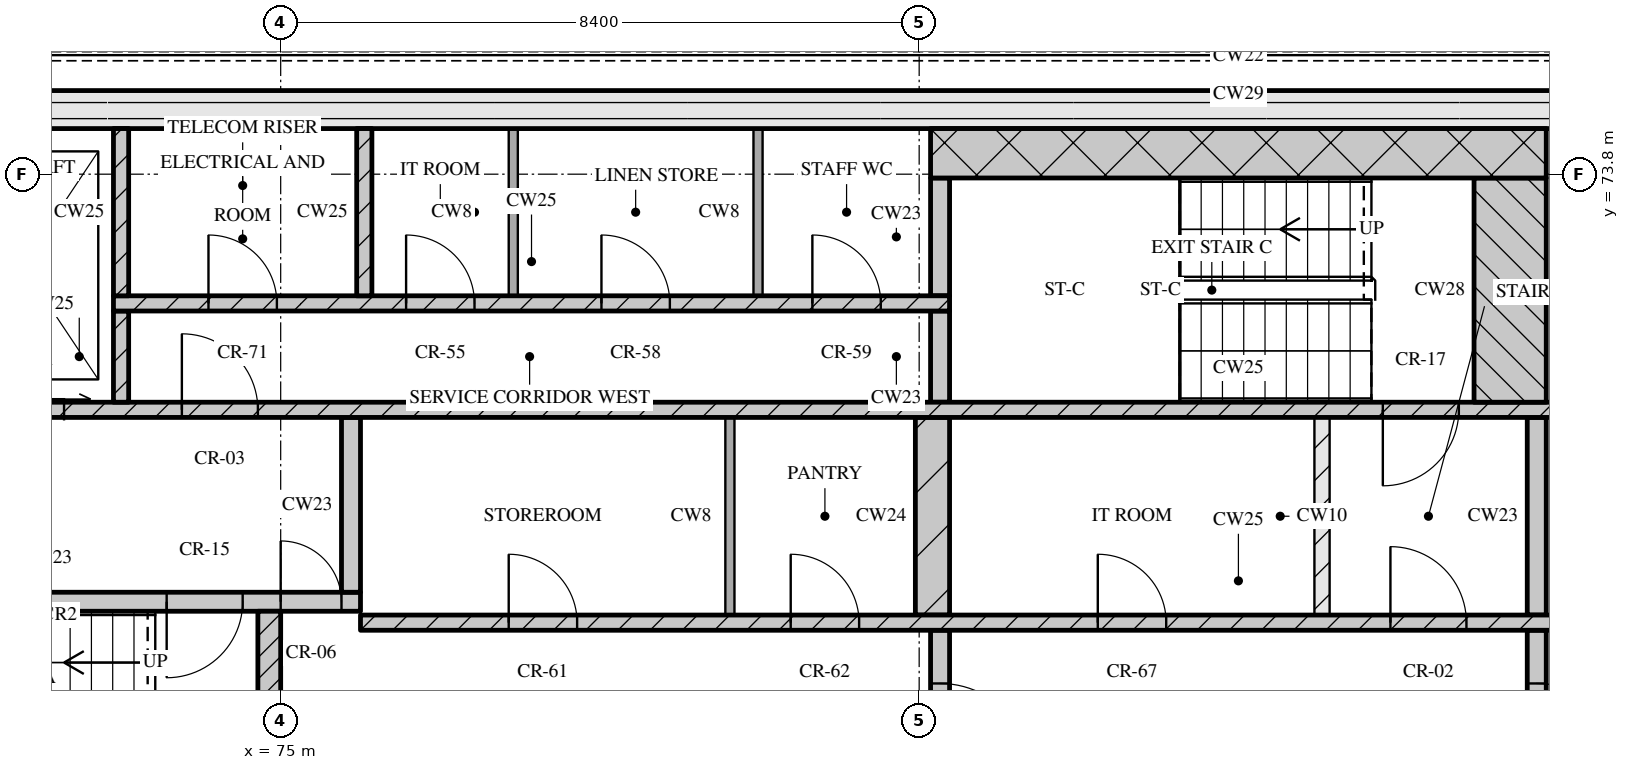
"""IFC4 building model, lengths in metres.
Left out: names, types, materials, properties, quantities, classifications, styles, units other than length and angle.
Written with IfcOpenShell. Run it as: python <this file> out.ifc"""

import sys

from ifc_helpers import new_model, si_unit, direction, frame, frame_2d, origin, place, context, subcontext, project, spatial, rectangle, extrude, element, fill, save


model = new_model("IFC4")
c1 = context("Model", 3, precision=1e-05, world=origin(), true_north=direction((0.0, 1.0)))
c2 = subcontext(c1, "Body", "Model", "MODEL_VIEW")
j1 = project(units=[si_unit("LENGTHUNIT", "METRE"), si_unit("PLANEANGLEUNIT", "RADIAN")], contexts=[c1])
p1 = place(None, origin())
s1 = spatial("IfcSite", under=j1, at=p1, CompositionType="ELEMENT")
p2 = place(p1, origin())
s2 = spatial("IfcBuilding", under=s1, at=p2, CompositionType="ELEMENT")
p3 = place(p2, frame((0.0, 0.0, 288.75)))
s3 = spatial("IfcBuildingStorey", under=s2, at=p3, CompositionType="ELEMENT", Elevation=288.75)
p4 = place(p3, frame((67.3, 74.65, 0.0), z_axis=(0.0, 0.0, 1.0), x_axis=(1.0, 0.0, 0.0)))
e1 = element("IfcWall", 1, at=p4, inside=s3, PredefinedType="SOLIDWALL", context=c2, shape_type="SweptSolid", body=[
    extrude(rectangle(XDim=40.6, YDim=0.5, at=frame_2d((20.3, 0.0))), origin(), (0.0, 0.0, 1.0), 3.32),
])
p5 = place(p3, frame((74.85, 65.2, 0.0), z_axis=(0.0, 0.0, 1.0), x_axis=(0.0, 1.0, 0.0)))
e2 = element("IfcWall", 2, at=p5, inside=s3, PredefinedType="SOLIDWALL", context=c2, shape_type="SweptSolid", body=[
    extrude(rectangle(XDim=2.85, YDim=0.3, at=frame_2d((1.425, 0.0))), origin(), (0.0, 0.0, 1.0), 3.32),
])
p6 = place(p3, frame((83.675, 65.2, 0.0), z_axis=(0.0, 0.0, 1.0), x_axis=(0.0, 1.0, 0.0)))
e3 = element("IfcWall", 3, at=p6, inside=s3, PredefinedType="SOLIDWALL", context=c2, shape_type="SweptSolid", body=[
    extrude(rectangle(XDim=2.6, YDim=0.25, at=frame_2d((1.3, 0.0))), origin(), (0.0, 0.0, 1.0), 3.32),
])
p7 = place(p6, frame((0.7, 0.0, 0.0)))
e4 = element("IfcOpeningElement", 4, at=p7, cuts=e3, PredefinedType="OPENING", context=c2, shape_type="SweptSolid", body=[
    extrude(rectangle(XDim=1.2, YDim=2.1, at=frame_2d((0.6, 1.05))), frame((0.0, 0.135, 0.0), z_axis=(0.0, -1.0, 0.0), x_axis=(1.0, 0.0, 0.0)), (0.0, 0.0, 1.0), 0.27),
])
p8 = place(p3, frame((91.525, 65.2, 0.0), z_axis=(0.0, 0.0, 1.0), x_axis=(0.0, 1.0, 0.0)))
e5 = element("IfcWall", 5, at=p8, inside=s3, PredefinedType="SOLIDWALL", context=c2, shape_type="SweptSolid", body=[
    extrude(rectangle(XDim=2.6, YDim=0.25, at=frame_2d((1.3, 0.0))), origin(), (0.0, 0.0, 1.0), 3.32),
])
p9 = place(p8, frame((0.7, 0.0, 0.0)))
e6 = element("IfcOpeningElement", 6, at=p9, cuts=e5, PredefinedType="OPENING", context=c2, shape_type="SweptSolid", body=[
    extrude(rectangle(XDim=1.2, YDim=2.1, at=frame_2d((0.6, 1.05))), frame((0.0, 0.135, 0.0), z_axis=(0.0, -1.0, 0.0), x_axis=(1.0, 0.0, 0.0)), (0.0, 0.0, 1.0), 0.27),
])
p10 = place(p3, frame((76.05, 67.9, 0.0), z_axis=(0.0, 0.0, 1.0), x_axis=(1.0, 0.0, 0.0)))
e7 = element("IfcWall", 7, at=p10, inside=s3, PredefinedType="SOLIDWALL", context=c2, shape_type="SweptSolid", body=[
    extrude(rectangle(XDim=23.1, YDim=0.2, at=frame_2d((11.55, 0.0))), origin(), (0.0, 0.0, 1.0), 3.32),
])
p11 = place(p10, frame((1.95, 0.0, 0.0)))
e8 = element("IfcOpeningElement", 8, at=p11, cuts=e7, PredefinedType="OPENING", context=c2, shape_type="SweptSolid", body=[
    extrude(rectangle(XDim=0.9, YDim=2.1, at=frame_2d((0.45, 1.05))), frame((0.0, 0.11, 0.0), z_axis=(0.0, -1.0, 0.0), x_axis=(1.0, 0.0, 0.0)), (0.0, 0.0, 1.0), 0.22),
])
p12 = place(p10, frame((5.66, 0.0, 0.0)))
e9 = element("IfcOpeningElement", 9, at=p12, cuts=e7, PredefinedType="OPENING", context=c2, shape_type="SweptSolid", body=[
    extrude(rectangle(XDim=0.9, YDim=2.1, at=frame_2d((0.45, 1.05))), frame((0.0, 0.11, 0.0), z_axis=(0.0, -1.0, 0.0), x_axis=(1.0, 0.0, 0.0)), (0.0, 0.0, 1.0), 0.22),
])
p13 = place(p10, frame((9.7, 0.0, 0.0)))
e10 = element("IfcOpeningElement", 10, at=p13, cuts=e7, PredefinedType="OPENING", context=c2, shape_type="SweptSolid", body=[
    extrude(rectangle(XDim=0.9, YDim=2.1, at=frame_2d((0.45, 1.05))), frame((0.0, 0.11, 0.0), z_axis=(0.0, -1.0, 0.0), x_axis=(1.0, 0.0, 0.0)), (0.0, 0.0, 1.0), 0.22),
])
p14 = place(p10, frame((13.55, 0.0, 0.0)))
e11 = element("IfcOpeningElement", 11, at=p14, cuts=e7, PredefinedType="OPENING", context=c2, shape_type="SweptSolid", body=[
    extrude(rectangle(XDim=1.0, YDim=2.1, at=frame_2d((0.5, 1.05))), frame((0.0, 0.11, 0.0), z_axis=(0.0, -1.0, 0.0), x_axis=(1.0, 0.0, 0.0)), (0.0, 0.0, 1.0), 0.22),
])
p15 = place(p10, frame((16.2, 0.0, 0.0)))
e12 = element("IfcOpeningElement", 12, at=p15, cuts=e7, PredefinedType="OPENING", context=c2, shape_type="SweptSolid", body=[
    extrude(rectangle(XDim=1.1, YDim=2.1, at=frame_2d((0.55, 1.05))), frame((0.0, 0.11, 0.0), z_axis=(0.0, -1.0, 0.0), x_axis=(1.0, 0.0, 0.0)), (0.0, 0.0, 1.0), 0.22),
])
p16 = place(p10, frame((18.7, 0.0, 0.0)))
e13 = element("IfcOpeningElement", 13, at=p16, cuts=e7, PredefinedType="OPENING", context=c2, shape_type="SweptSolid", body=[
    extrude(rectangle(XDim=1.1, YDim=2.1, at=frame_2d((0.55, 1.05))), frame((0.0, 0.11, 0.0), z_axis=(0.0, -1.0, 0.0), x_axis=(1.0, 0.0, 0.0)), (0.0, 0.0, 1.0), 0.22),
])
p17 = place(p10, frame((21.2, 0.0, 0.0)))
e14 = element("IfcOpeningElement", 14, at=p17, cuts=e7, PredefinedType="OPENING", context=c2, shape_type="SweptSolid", body=[
    extrude(rectangle(XDim=1.1, YDim=2.1, at=frame_2d((0.55, 1.05))), frame((0.0, 0.11, 0.0), z_axis=(0.0, -1.0, 0.0), x_axis=(1.0, 0.0, 0.0)), (0.0, 0.0, 1.0), 0.22),
])
p18 = place(p3, frame((80.91, 68.0, 0.0), z_axis=(0.0, 0.0, 1.0), x_axis=(0.0, 1.0, 0.0)))
e15 = element("IfcWall", 15, at=p18, inside=s3, PredefinedType="PARTITIONING", context=c2, shape_type="SweptSolid", body=[
    extrude(rectangle(XDim=2.6, YDim=0.12, at=frame_2d((1.3, 0.0))), origin(), (0.0, 0.0, 1.0), 3.32),
])
p19 = place(p3, frame((83.575, 68.0, 0.0), z_axis=(0.0, 0.0, 1.0), x_axis=(0.0, 1.0, 0.0)))
e16 = element("IfcWall", 16, at=p19, inside=s3, PredefinedType="SOLIDWALL", context=c2, shape_type="SweptSolid", body=[
    extrude(rectangle(XDim=2.6, YDim=0.45, at=frame_2d((1.3, 0.0))), origin(), (0.0, 0.0, 1.0), 3.32),
])
p20 = place(p3, frame((88.7, 68.0, 0.0), z_axis=(0.0, 0.0, 1.0), x_axis=(0.0, 1.0, 0.0)))
e17 = element("IfcWall", 17, at=p20, inside=s3, PredefinedType="PARTITIONING", context=c2, shape_type="SweptSolid", body=[
    extrude(rectangle(XDim=2.6, YDim=0.2, at=frame_2d((1.3, 0.0))), origin(), (0.0, 0.0, 1.0), 3.32),
])
p21 = place(p3, frame((91.525, 68.0, 0.0), z_axis=(0.0, 0.0, 1.0), x_axis=(0.0, 1.0, 0.0)))
e18 = element("IfcWall", 18, at=p21, inside=s3, PredefinedType="SOLIDWALL", context=c2, shape_type="SweptSolid", body=[
    extrude(rectangle(XDim=2.6, YDim=0.25, at=frame_2d((1.3, 0.0))), origin(), (0.0, 0.0, 1.0), 3.32),
])
p22 = place(p3, frame((67.8, 68.175, 0.0), z_axis=(0.0, 0.0, 1.0), x_axis=(1.0, 0.0, 0.0)))
e19 = element("IfcWall", 19, at=p22, inside=s3, PredefinedType="SOLIDWALL", context=c2, shape_type="SweptSolid", body=[
    extrude(rectangle(XDim=8.25, YDim=0.25, at=frame_2d((4.125, 0.0))), origin(), (0.0, 0.0, 1.0), 3.32),
])
p23 = place(p22, frame((5.7, 0.0, 0.0)))
e20 = element("IfcOpeningElement", 20, at=p23, cuts=e19, PredefinedType="OPENING", context=c2, shape_type="SweptSolid", body=[
    extrude(rectangle(XDim=1.0, YDim=2.1, at=frame_2d((0.5, 1.05))), frame((0.0, 0.135, 0.0), z_axis=(0.0, -1.0, 0.0), x_axis=(1.0, 0.0, 0.0)), (0.0, 0.0, 1.0), 0.27),
])
p24 = place(p22, frame((7.2, 0.0, 0.0)))
e21 = element("IfcOpeningElement", 21, at=p24, cuts=e19, PredefinedType="OPENING", context=c2, shape_type="SweptSolid", body=[
    extrude(rectangle(XDim=0.8, YDim=2.1, at=frame_2d((0.4, 1.05))), frame((0.0, 0.135, 0.0), z_axis=(0.0, -1.0, 0.0), x_axis=(1.0, 0.0, 0.0)), (0.0, 0.0, 1.0), 0.27),
])
p25 = place(p3, frame((75.925, 68.3, 0.0), z_axis=(0.0, 0.0, 1.0), x_axis=(0.0, 1.0, 0.0)))
e22 = element("IfcWall", 22, at=p25, inside=s3, PredefinedType="SOLIDWALL", context=c2, shape_type="SweptSolid", body=[
    extrude(rectangle(XDim=2.3, YDim=0.25, at=frame_2d((1.15, 0.0))), origin(), (0.0, 0.0, 1.0), 3.32),
])
p26 = place(p3, frame((67.8, 70.7, 0.0), z_axis=(0.0, 0.0, 1.0), x_axis=(1.0, 0.0, 0.0)))
e23 = element("IfcWall", 23, at=p26, inside=s3, PredefinedType="SOLIDWALL", context=c2, shape_type="SweptSolid", body=[
    extrude(rectangle(XDim=39.6, YDim=0.2, at=frame_2d((19.8, 0.0))), origin(), (0.0, 0.0, 1.0), 3.32),
])
p27 = place(p26, frame((0.65, 0.0, 0.0)))
e24 = element("IfcOpeningElement", 24, at=p27, cuts=e23, PredefinedType="OPENING", context=c2, shape_type="SweptSolid", body=[
    extrude(rectangle(XDim=1.1, YDim=2.1, at=frame_2d((0.55, 1.05))), frame((0.0, 0.11, 0.0), z_axis=(0.0, -1.0, 0.0), x_axis=(1.0, 0.0, 0.0)), (0.0, 0.0, 1.0), 0.22),
])
p28 = place(p26, frame((3.25, 0.0, 0.0)))
e25 = element("IfcOpeningElement", 25, at=p28, cuts=e23, PredefinedType="OPENING", context=c2, shape_type="SweptSolid", body=[
    extrude(rectangle(XDim=1.1, YDim=2.1, at=frame_2d((0.55, 1.05))), frame((0.0, 0.11, 0.0), z_axis=(0.0, -1.0, 0.0), x_axis=(1.0, 0.0, 0.0)), (0.0, 0.0, 1.0), 0.22),
])
p29 = place(p26, frame((5.9, 0.0, 0.0)))
e26 = element("IfcOpeningElement", 26, at=p29, cuts=e23, PredefinedType="OPENING", context=c2, shape_type="SweptSolid", body=[
    extrude(rectangle(XDim=1.0, YDim=2.1, at=frame_2d((0.5, 1.05))), frame((0.0, 0.11, 0.0), z_axis=(0.0, -1.0, 0.0), x_axis=(1.0, 0.0, 0.0)), (0.0, 0.0, 1.0), 0.22),
])
p30 = place(p26, frame((21.7, 0.0, 0.0)))
e27 = element("IfcOpeningElement", 27, at=p30, cuts=e23, PredefinedType="OPENING", context=c2, shape_type="SweptSolid", body=[
    extrude(rectangle(XDim=1.0, YDim=2.1, at=frame_2d((0.5, 1.05))), frame((0.0, 0.11, 0.0), z_axis=(0.0, -1.0, 0.0), x_axis=(1.0, 0.0, 0.0)), (0.0, 0.0, 1.0), 0.22),
])
p31 = place(p26, frame((32.7, 0.0, 0.0)))
e28 = element("IfcOpeningElement", 28, at=p31, cuts=e23, PredefinedType="OPENING", context=c2, shape_type="SweptSolid", body=[
    extrude(rectangle(XDim=1.0, YDim=2.1, at=frame_2d((0.5, 1.05))), frame((0.0, 0.11, 0.0), z_axis=(0.0, -1.0, 0.0), x_axis=(1.0, 0.0, 0.0)), (0.0, 0.0, 1.0), 0.22),
])
p32 = place(p26, frame((35.25, 0.0, 0.0)))
e29 = element("IfcOpeningElement", 29, at=p32, cuts=e23, PredefinedType="OPENING", context=c2, shape_type="SweptSolid", body=[
    extrude(rectangle(XDim=1.1, YDim=2.1, at=frame_2d((0.55, 1.05))), frame((0.0, 0.11, 0.0), z_axis=(0.0, -1.0, 0.0), x_axis=(1.0, 0.0, 0.0)), (0.0, 0.0, 1.0), 0.22),
])
p33 = place(p26, frame((37.85, 0.0, 0.0)))
e30 = element("IfcOpeningElement", 30, at=p33, cuts=e23, PredefinedType="OPENING", context=c2, shape_type="SweptSolid", body=[
    extrude(rectangle(XDim=1.1, YDim=2.1, at=frame_2d((0.55, 1.05))), frame((0.0, 0.11, 0.0), z_axis=(0.0, -1.0, 0.0), x_axis=(1.0, 0.0, 0.0)), (0.0, 0.0, 1.0), 0.22),
])
p34 = place(p3, frame((72.9, 70.8, 0.0), z_axis=(0.0, 0.0, 1.0), x_axis=(0.0, 1.0, 0.0)))
e31 = element("IfcWall", 31, at=p34, inside=s3, PredefinedType="SOLIDWALL", context=c2, shape_type="SweptSolid", body=[
    extrude(rectangle(XDim=1.2, YDim=0.2, at=frame_2d((0.6, 0.0))), origin(), (0.0, 0.0, 1.0), 3.32),
])
p35 = place(p3, frame((83.675, 70.8, 0.0), z_axis=(0.0, 0.0, 1.0), x_axis=(0.0, 1.0, 0.0)))
e32 = element("IfcWall", 32, at=p35, inside=s3, PredefinedType="SOLIDWALL", context=c2, shape_type="SweptSolid", body=[
    extrude(rectangle(XDim=1.2, YDim=0.25, at=frame_2d((0.6, 0.0))), origin(), (0.0, 0.0, 1.0), 3.32),
])
p36 = place(p3, frame((91.175, 70.8, 0.0), z_axis=(0.0, 0.0, 1.0), x_axis=(0.0, 1.0, 0.0)))
e33 = element("IfcWall", 33, at=p36, inside=s3, PredefinedType="SOLIDWALL", context=c2, shape_type="SweptSolid", body=[
    extrude(rectangle(XDim=2.95, YDim=0.95, at=frame_2d((1.475, 0.0))), origin(), (0.0, 0.0, 1.0), 3.32),
])
p37 = place(p3, frame((72.8, 72.1, 0.0), z_axis=(0.0, 0.0, 1.0), x_axis=(1.0, 0.0, 0.0)))
e34 = element("IfcWall", 34, at=p37, inside=s3, PredefinedType="SOLIDWALL", context=c2, shape_type="SweptSolid", body=[
    extrude(rectangle(XDim=11.0, YDim=0.2, at=frame_2d((5.5, 0.0))), origin(), (0.0, 0.0, 1.0), 3.32),
])
p38 = place(p37, frame((1.25, 0.0, 0.0)))
e35 = element("IfcOpeningElement", 35, at=p38, cuts=e34, PredefinedType="OPENING", context=c2, shape_type="SweptSolid", body=[
    extrude(rectangle(XDim=0.9, YDim=2.1, at=frame_2d((0.45, 1.05))), frame((0.0, 0.11, 0.0), z_axis=(0.0, -1.0, 0.0), x_axis=(1.0, 0.0, 0.0)), (0.0, 0.0, 1.0), 0.22),
])
p39 = place(p37, frame((3.85, 0.0, 0.0)))
e36 = element("IfcOpeningElement", 36, at=p39, cuts=e34, PredefinedType="OPENING", context=c2, shape_type="SweptSolid", body=[
    extrude(rectangle(XDim=0.9, YDim=2.1, at=frame_2d((0.45, 1.05))), frame((0.0, 0.11, 0.0), z_axis=(0.0, -1.0, 0.0), x_axis=(1.0, 0.0, 0.0)), (0.0, 0.0, 1.0), 0.22),
])
p40 = place(p37, frame((6.42, 0.0, 0.0)))
e37 = element("IfcOpeningElement", 37, at=p40, cuts=e34, PredefinedType="OPENING", context=c2, shape_type="SweptSolid", body=[
    extrude(rectangle(XDim=0.9, YDim=2.1, at=frame_2d((0.45, 1.05))), frame((0.0, 0.11, 0.0), z_axis=(0.0, -1.0, 0.0), x_axis=(1.0, 0.0, 0.0)), (0.0, 0.0, 1.0), 0.22),
])
p41 = place(p37, frame((9.195, 0.0, 0.0)))
e38 = element("IfcOpeningElement", 38, at=p41, cuts=e34, PredefinedType="OPENING", context=c2, shape_type="SweptSolid", body=[
    extrude(rectangle(XDim=0.9, YDim=2.1, at=frame_2d((0.45, 1.05))), frame((0.0, 0.11, 0.0), z_axis=(0.0, -1.0, 0.0), x_axis=(1.0, 0.0, 0.0)), (0.0, 0.0, 1.0), 0.22),
])
for number, where, z_axis, x_axis in (
    (39, (72.9, 72.2, 0.0), (0.0, 0.0, 1.0), (0.0, 1.0, 0.0)),
    (40, (76.1, 72.2, 0.0), (0.0, 0.0, 1.0), (0.0, 1.0, 0.0)),
):
    element("IfcWall", number, at=place(p3, frame(where, z_axis=z_axis, x_axis=x_axis)), inside=s3, PredefinedType="SOLIDWALL", context=c2, shape_type="SweptSolid", body=[
        extrude(rectangle(XDim=2.2, YDim=0.2, at=frame_2d((1.1, 0.0))), origin(), (0.0, 0.0, 1.0), 3.32),
    ])
for number, where, z_axis, x_axis in (
    (41, (78.06, 72.2, 0.0), (0.0, 0.0, 1.0), (0.0, 1.0, 0.0)),
    (42, (81.28, 72.2, 0.0), (0.0, 0.0, 1.0), (0.0, 1.0, 0.0)),
):
    element("IfcWall", number, at=place(p3, frame(where, z_axis=z_axis, x_axis=x_axis)), inside=s3, PredefinedType="PARTITIONING", context=c2, shape_type="SweptSolid", body=[
        extrude(rectangle(XDim=2.2, YDim=0.12, at=frame_2d((1.1, 0.0))), origin(), (0.0, 0.0, 1.0), 3.32),
    ])
p42 = place(p3, frame((83.675, 72.2, 0.0), z_axis=(0.0, 0.0, 1.0), x_axis=(0.0, 1.0, 0.0)))
e43 = element("IfcWall", 43, at=p42, inside=s3, PredefinedType="SOLIDWALL", context=c2, shape_type="SweptSolid", body=[
    extrude(rectangle(XDim=1.55, YDim=0.25, at=frame_2d((0.775, 0.0))), origin(), (0.0, 0.0, 1.0), 3.32),
])
p43 = place(p3, frame((83.55, 74.075, 0.0), z_axis=(0.0, 0.0, 1.0), x_axis=(1.0, 0.0, 0.0)))
e44 = element("IfcWall", 44, at=p43, inside=s3, PredefinedType="SOLIDWALL", context=c2, shape_type="SweptSolid", body=[
    extrude(rectangle(XDim=8.1, YDim=0.65, at=frame_2d((4.05, 0.0))), origin(), (0.0, 0.0, 1.0), 3.32),
])
p44 = place(p7, origin())
e45 = element("IfcDoor", 45, at=p44, inside=s3, OperationType="SINGLE_SWING_RIGHT", PredefinedType="DOOR", context=c2, shape_type="SweptSolid", body=[
    extrude(rectangle(XDim=1.2, YDim=2.1, at=frame_2d((0.6, 1.05))), frame((0.0, 0.025, 0.0), z_axis=(0.0, -1.0, 0.0), x_axis=(1.0, 0.0, 0.0)), (0.0, 0.0, 1.0), 0.05),
])
fill(e4, e45)
p45 = place(p9, origin())
e46 = element("IfcDoor", 46, at=p45, inside=s3, OperationType="SINGLE_SWING_RIGHT", PredefinedType="DOOR", context=c2, shape_type="SweptSolid", body=[
    extrude(rectangle(XDim=1.2, YDim=2.1, at=frame_2d((0.6, 1.05))), frame((0.0, 0.025, 0.0), z_axis=(0.0, -1.0, 0.0), x_axis=(1.0, 0.0, 0.0)), (0.0, 0.0, 1.0), 0.05),
])
fill(e6, e46)
p46 = place(p11, origin())
e47 = element("IfcDoor", 47, at=p46, inside=s3, OperationType="SINGLE_SWING_LEFT", PredefinedType="DOOR", context=c2, shape_type="SweptSolid", body=[
    extrude(rectangle(XDim=0.9, YDim=2.1, at=frame_2d((0.45, 1.05))), frame((0.0, 0.025, 0.0), z_axis=(0.0, -1.0, 0.0), x_axis=(1.0, 0.0, 0.0)), (0.0, 0.0, 1.0), 0.05),
])
fill(e8, e47)
p47 = place(p12, origin())
e48 = element("IfcDoor", 48, at=p47, inside=s3, OperationType="SINGLE_SWING_LEFT", PredefinedType="DOOR", context=c2, shape_type="SweptSolid", body=[
    extrude(rectangle(XDim=0.9, YDim=2.1, at=frame_2d((0.45, 1.05))), frame((0.0, 0.025, 0.0), z_axis=(0.0, -1.0, 0.0), x_axis=(1.0, 0.0, 0.0)), (0.0, 0.0, 1.0), 0.05),
])
fill(e9, e48)
p48 = place(p13, origin())
e49 = element("IfcDoor", 49, at=p48, inside=s3, OperationType="SINGLE_SWING_LEFT", PredefinedType="DOOR", context=c2, shape_type="SweptSolid", body=[
    extrude(rectangle(XDim=0.9, YDim=2.1, at=frame_2d((0.45, 1.05))), frame((0.0, 0.025, 0.0), z_axis=(0.0, -1.0, 0.0), x_axis=(1.0, 0.0, 0.0)), (0.0, 0.0, 1.0), 0.05),
])
fill(e10, e49)
p49 = place(p14, origin())
e50 = element("IfcDoor", 50, at=p49, inside=s3, OperationType="SINGLE_SWING_LEFT", PredefinedType="DOOR", context=c2, shape_type="SweptSolid", body=[
    extrude(rectangle(XDim=1.0, YDim=2.1, at=frame_2d((0.5, 1.05))), frame((0.0, 0.025, 0.0), z_axis=(0.0, -1.0, 0.0), x_axis=(1.0, 0.0, 0.0)), (0.0, 0.0, 1.0), 0.05),
])
fill(e11, e50)
p50 = place(p23, origin())
e51 = element("IfcDoor", 51, at=p50, inside=s3, OperationType="SINGLE_SWING_RIGHT", PredefinedType="DOOR", context=c2, shape_type="SweptSolid", body=[
    extrude(rectangle(XDim=1.0, YDim=2.1, at=frame_2d((0.5, 1.05))), frame((0.0, 0.025, 0.0), z_axis=(0.0, -1.0, 0.0), x_axis=(1.0, 0.0, 0.0)), (0.0, 0.0, 1.0), 0.05),
])
fill(e20, e51)
p51 = place(p24, origin())
e52 = element("IfcDoor", 52, at=p51, inside=s3, OperationType="SINGLE_SWING_LEFT", PredefinedType="DOOR", context=c2, shape_type="SweptSolid", body=[
    extrude(rectangle(XDim=0.8, YDim=2.1, at=frame_2d((0.4, 1.05))), frame((0.0, 0.025, 0.0), z_axis=(0.0, -1.0, 0.0), x_axis=(1.0, 0.0, 0.0)), (0.0, 0.0, 1.0), 0.05),
])
fill(e21, e52)
p52 = place(p28, origin())
e53 = element("IfcDoor", 53, at=p52, inside=s3, OperationType="SLIDING_TO_RIGHT", PredefinedType="DOOR", context=c2, shape_type="SweptSolid", body=[
    extrude(rectangle(XDim=1.1, YDim=2.1, at=frame_2d((0.55, 1.05))), frame((0.0, 0.025, 0.0), z_axis=(0.0, -1.0, 0.0), x_axis=(1.0, 0.0, 0.0)), (0.0, 0.0, 1.0), 0.05),
])
fill(e25, e53)
p53 = place(p29, origin())
e54 = element("IfcDoor", 54, at=p53, inside=s3, OperationType="SINGLE_SWING_LEFT", PredefinedType="DOOR", context=c2, shape_type="SweptSolid", body=[
    extrude(rectangle(XDim=1.0, YDim=2.1, at=frame_2d((0.5, 1.05))), frame((0.0, 0.025, 0.0), z_axis=(0.0, -1.0, 0.0), x_axis=(1.0, 0.0, 0.0)), (0.0, 0.0, 1.0), 0.05),
])
fill(e26, e54)
p54 = place(p30, origin())
e55 = element("IfcDoor", 55, at=p54, inside=s3, OperationType="SINGLE_SWING_RIGHT", PredefinedType="DOOR", context=c2, shape_type="SweptSolid", body=[
    extrude(rectangle(XDim=1.0, YDim=2.1, at=frame_2d((0.5, 1.05))), frame((0.0, 0.025, 0.0), z_axis=(0.0, -1.0, 0.0), x_axis=(1.0, 0.0, 0.0)), (0.0, 0.0, 1.0), 0.05),
])
fill(e27, e55)
p55 = place(p38, origin())
e56 = element("IfcDoor", 56, at=p55, inside=s3, OperationType="SINGLE_SWING_LEFT", PredefinedType="DOOR", context=c2, shape_type="SweptSolid", body=[
    extrude(rectangle(XDim=0.9, YDim=2.1, at=frame_2d((0.45, 1.05))), frame((0.0, 0.025, 0.0), z_axis=(0.0, -1.0, 0.0), x_axis=(1.0, 0.0, 0.0)), (0.0, 0.0, 1.0), 0.05),
])
fill(e35, e56)
p56 = place(p39, origin())
e57 = element("IfcDoor", 57, at=p56, inside=s3, OperationType="SINGLE_SWING_LEFT", PredefinedType="DOOR", context=c2, shape_type="SweptSolid", body=[
    extrude(rectangle(XDim=0.9, YDim=2.1, at=frame_2d((0.45, 1.05))), frame((0.0, 0.025, 0.0), z_axis=(0.0, -1.0, 0.0), x_axis=(1.0, 0.0, 0.0)), (0.0, 0.0, 1.0), 0.05),
])
fill(e36, e57)
p57 = place(p40, origin())
e58 = element("IfcDoor", 58, at=p57, inside=s3, OperationType="SINGLE_SWING_LEFT", PredefinedType="DOOR", context=c2, shape_type="SweptSolid", body=[
    extrude(rectangle(XDim=0.9, YDim=2.1, at=frame_2d((0.45, 1.05))), frame((0.0, 0.025, 0.0), z_axis=(0.0, -1.0, 0.0), x_axis=(1.0, 0.0, 0.0)), (0.0, 0.0, 1.0), 0.05),
])
fill(e37, e58)
p58 = place(p41, origin())
e59 = element("IfcDoor", 59, at=p58, inside=s3, OperationType="SINGLE_SWING_LEFT", PredefinedType="DOOR", context=c2, shape_type="SweptSolid", body=[
    extrude(rectangle(XDim=0.9, YDim=2.1, at=frame_2d((0.45, 1.05))), frame((0.0, 0.025, 0.0), z_axis=(0.0, -1.0, 0.0), x_axis=(1.0, 0.0, 0.0)), (0.0, 0.0, 1.0), 0.05),
])
fill(e38, e59)
save(model, sys.argv[1])
